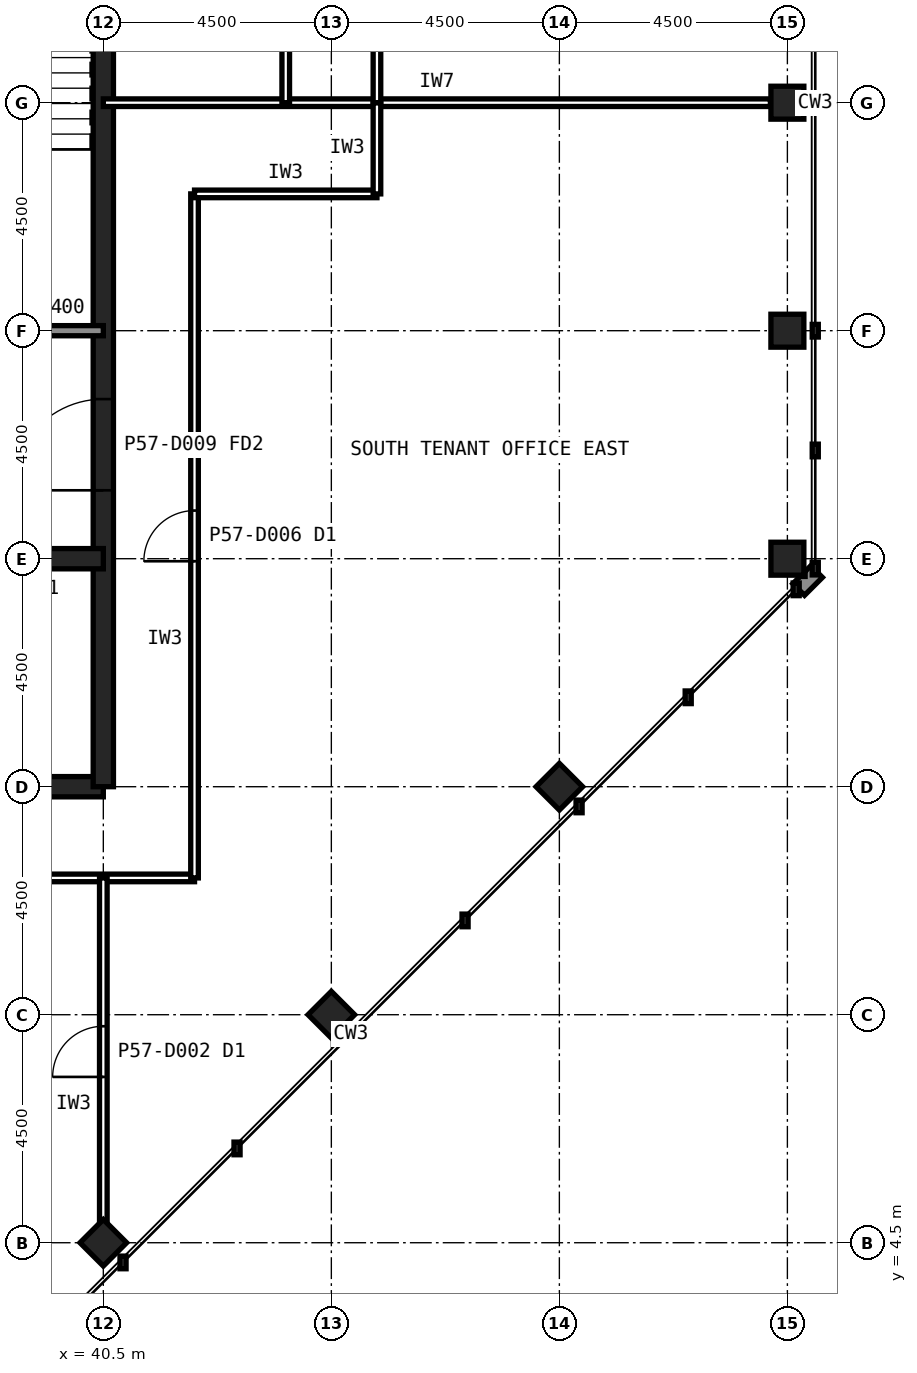
"""IFC4 building model, lengths in metres.
Left out: names, types, materials, properties, quantities, classifications, styles, units other than length and angle.
Written with IfcOpenShell. Run it as: python <this file> out.ifc"""

import sys

from ifc_helpers import new_model, si_unit, direction, frame, frame_2d, origin, origin_2d, place, context, subcontext, project, spatial, rectangle, hollow_rectangle, extrude, element, fill, save


model = new_model("IFC4")
c1 = context("Model", 3, precision=1e-05, world=origin(), true_north=direction((0.0, 1.0)))
c2 = subcontext(c1, "Body", "Model", "MODEL_VIEW")
j1 = project(units=[si_unit("LENGTHUNIT", "METRE"), si_unit("PLANEANGLEUNIT", "RADIAN")], contexts=[c1])
p1 = place(None, origin())
s1 = spatial("IfcSite", under=j1, at=p1, CompositionType="ELEMENT")
p2 = place(p1, origin())
s2 = spatial("IfcBuilding", under=s1, at=p2, CompositionType="ELEMENT")
p3 = place(p2, frame((0.0, 0.0, 238.6)))
s3 = spatial("IfcBuildingStorey", under=s2, at=p3, CompositionType="ELEMENT", Elevation=238.6)
for number, where, z_axis, x_axis in (
    (1, (54.0, 18.0, 0.0), (0.0, 0.0, 1.0), (1.0, 0.0, 0.0)),
    (2, (54.0, 22.5, 0.0), (0.0, 0.0, 1.0), (1.0, 0.0, 0.0)),
    (3, (54.0, 27.0, 0.0), (0.0, 0.0, 1.0), (1.0, 0.0, 0.0)),
    (4, (40.5, 4.5, 0.0), (0.0, 0.0, 1.0), (0.707, 0.707, 0.0)),
    (5, (45.0, 9.0, 0.0), (0.0, 0.0, 1.0), (0.707, 0.707, 0.0)),
    (6, (49.5, 13.5, 0.0), (0.0, 0.0, 1.0), (0.707, 0.707, 0.0)),
):
    element("IfcColumn", number, at=place(p3, frame(where, z_axis=z_axis, x_axis=x_axis)), inside=s3, PredefinedType="COLUMN", context=c2, shape_type="SweptSolid", body=[
        extrude(hollow_rectangle(XDim=0.65, YDim=0.65, WallThickness=0.032, at=origin_2d()), origin(), (0.0, 0.0, 1.0), 4.0),
    ])
p4 = place(p3, frame((13.5, 13.5, 0.0), z_axis=(0.0, 0.0, 1.0), x_axis=(1.0, 0.0, 0.0)))
e7 = element("IfcWall", 7, at=p4, inside=s3, PredefinedType="SHEAR", context=c2, shape_type="SweptSolid", body=[
    extrude(rectangle(XDim=27.0, YDim=0.4, at=frame_2d((13.5, 0.0))), origin(), (0.0, 0.0, 1.0), 4.0),
])
p5 = place(p3, frame((40.5, 13.5, 0.0), z_axis=(0.0, 0.0, 1.0), x_axis=(0.0, 1.0, 0.0)))
e8 = element("IfcWall", 8, at=p5, inside=s3, PredefinedType="SHEAR", context=c2, shape_type="SweptSolid", body=[
    extrude(rectangle(XDim=27.0, YDim=0.4, at=frame_2d((13.5, 0.0))), origin(), (0.0, 0.0, 1.0), 4.0),
])
p6 = place(p5, frame((5.85, 0.0, 0.0)))
e9 = element("IfcOpeningElement", 9, at=p6, cuts=e8, PredefinedType="OPENING", context=c2, shape_type="SweptSolid", body=[
    extrude(rectangle(XDim=1.8, YDim=2.1, at=frame_2d((0.9, 1.05))), frame((0.0, 0.21, 0.0), z_axis=(0.0, -1.0, 0.0), x_axis=(1.0, 0.0, 0.0)), (0.0, 0.0, 1.0), 0.42),
])
p7 = place(p5, frame((19.65, 0.0, 0.0)))
e10 = element("IfcOpeningElement", 10, at=p7, cuts=e8, PredefinedType="OPENING", context=c2, shape_type="SweptSolid", body=[
    extrude(rectangle(XDim=1.2, YDim=2.1, at=frame_2d((0.6, 1.05))), frame((0.0, 0.21, 0.0), z_axis=(0.0, -1.0, 0.0), x_axis=(1.0, 0.0, 0.0)), (0.0, 0.0, 1.0), 0.42),
])
p8 = place(p3, frame((13.5, 18.0, 0.0), z_axis=(0.0, 0.0, 1.0), x_axis=(1.0, 0.0, 0.0)))
e11 = element("IfcWall", 11, at=p8, inside=s3, PredefinedType="SHEAR", context=c2, shape_type="SweptSolid", body=[
    extrude(rectangle(XDim=27.0, YDim=0.4, at=frame_2d((13.5, 0.0))), origin(), (0.0, 0.0, 1.0), 4.0),
])
p9 = place(p8, frame((24.3, 0.0, 0.0)))
e12 = element("IfcOpeningElement", 12, at=p9, cuts=e11, PredefinedType="OPENING", context=c2, shape_type="SweptSolid", body=[
    extrude(rectangle(XDim=0.9, YDim=2.1, at=frame_2d((0.45, 1.05))), frame((0.0, 0.21, 0.0), z_axis=(0.0, -1.0, 0.0), x_axis=(1.0, 0.0, 0.0)), (0.0, 0.0, 1.0), 0.42),
])
p10 = place(p8, frame((5.45, 0.0, 0.0)))
e13 = element("IfcOpeningElement", 13, at=p10, cuts=e11, PredefinedType="OPENING", context=c2, shape_type="SweptSolid", body=[
    extrude(rectangle(XDim=1.1, YDim=2.1, at=frame_2d((0.55, 1.05))), frame((0.0, 0.21, 0.0), z_axis=(0.0, -1.0, 0.0), x_axis=(1.0, 0.0, 0.0)), (0.0, 0.0, 1.0), 0.42),
])
p11 = place(p8, frame((8.45, 0.0, 0.0)))
e14 = element("IfcOpeningElement", 14, at=p11, cuts=e11, PredefinedType="OPENING", context=c2, shape_type="SweptSolid", body=[
    extrude(rectangle(XDim=1.1, YDim=2.1, at=frame_2d((0.55, 1.05))), frame((0.0, 0.21, 0.0), z_axis=(0.0, -1.0, 0.0), x_axis=(1.0, 0.0, 0.0)), (0.0, 0.0, 1.0), 0.42),
])
p12 = place(p8, frame((11.45, 0.0, 0.0)))
e15 = element("IfcOpeningElement", 15, at=p12, cuts=e11, PredefinedType="OPENING", context=c2, shape_type="SweptSolid", body=[
    extrude(rectangle(XDim=1.1, YDim=2.1, at=frame_2d((0.55, 1.05))), frame((0.0, 0.21, 0.0), z_axis=(0.0, -1.0, 0.0), x_axis=(1.0, 0.0, 0.0)), (0.0, 0.0, 1.0), 0.42),
])
p13 = place(p8, frame((14.45, 0.0, 0.0)))
e16 = element("IfcOpeningElement", 16, at=p13, cuts=e11, PredefinedType="OPENING", context=c2, shape_type="SweptSolid", body=[
    extrude(rectangle(XDim=1.1, YDim=2.1, at=frame_2d((0.55, 1.05))), frame((0.0, 0.21, 0.0), z_axis=(0.0, -1.0, 0.0), x_axis=(1.0, 0.0, 0.0)), (0.0, 0.0, 1.0), 0.42),
])
p14 = place(p8, frame((17.45, 0.0, 0.0)))
e17 = element("IfcOpeningElement", 17, at=p14, cuts=e11, PredefinedType="OPENING", context=c2, shape_type="SweptSolid", body=[
    extrude(rectangle(XDim=1.1, YDim=2.1, at=frame_2d((0.55, 1.05))), frame((0.0, 0.21, 0.0), z_axis=(0.0, -1.0, 0.0), x_axis=(1.0, 0.0, 0.0)), (0.0, 0.0, 1.0), 0.42),
])
p15 = place(p8, frame((20.45, 0.0, 0.0)))
e18 = element("IfcOpeningElement", 18, at=p15, cuts=e11, PredefinedType="OPENING", context=c2, shape_type="SweptSolid", body=[
    extrude(rectangle(XDim=1.1, YDim=2.1, at=frame_2d((0.55, 1.05))), frame((0.0, 0.21, 0.0), z_axis=(0.0, -1.0, 0.0), x_axis=(1.0, 0.0, 0.0)), (0.0, 0.0, 1.0), 0.42),
])
p16 = place(p8, frame((1.6, 0.0, 0.0)))
e19 = element("IfcOpeningElement", 19, at=p16, cuts=e11, PredefinedType="OPENING", context=c2, shape_type="SweptSolid", body=[
    extrude(rectangle(XDim=1.3, YDim=2.2, at=frame_2d((0.65, 1.1))), frame((0.0, 0.21, 0.0), z_axis=(0.0, -1.0, 0.0), x_axis=(1.0, 0.0, 0.0)), (0.0, 0.0, 1.0), 0.42),
])
p17 = place(p3, frame((13.5, 22.5, 0.0), z_axis=(0.0, 0.0, 1.0), x_axis=(1.0, 0.0, 0.0)))
e20 = element("IfcWall", 20, at=p17, inside=s3, PredefinedType="SOLIDWALL", context=c2, shape_type="SweptSolid", body=[
    extrude(rectangle(XDim=27.0, YDim=0.2, at=frame_2d((13.5, 0.0))), origin(), (0.0, 0.0, 1.0), 3.84),
])
p18 = place(p17, frame((1.65, 0.0, 0.0)))
e21 = element("IfcOpeningElement", 21, at=p18, cuts=e20, PredefinedType="OPENING", context=c2, shape_type="SweptSolid", body=[
    extrude(rectangle(XDim=1.2, YDim=2.1, at=frame_2d((0.6, 1.05))), frame((0.0, 0.11, 0.0), z_axis=(0.0, -1.0, 0.0), x_axis=(1.0, 0.0, 0.0)), (0.0, 0.0, 1.0), 0.22),
])
p19 = place(p17, frame((6.025, 0.0, 0.0)))
e22 = element("IfcOpeningElement", 22, at=p19, cuts=e20, PredefinedType="OPENING", context=c2, shape_type="SweptSolid", body=[
    extrude(rectangle(XDim=1.0, YDim=2.1, at=frame_2d((0.5, 1.05))), frame((0.0, 0.11, 0.0), z_axis=(0.0, -1.0, 0.0), x_axis=(1.0, 0.0, 0.0)), (0.0, 0.0, 1.0), 0.22),
])
p20 = place(p17, frame((10.525, 0.0, 0.0)))
e23 = element("IfcOpeningElement", 23, at=p20, cuts=e20, PredefinedType="OPENING", context=c2, shape_type="SweptSolid", body=[
    extrude(rectangle(XDim=1.0, YDim=2.1, at=frame_2d((0.5, 1.05))), frame((0.0, 0.11, 0.0), z_axis=(0.0, -1.0, 0.0), x_axis=(1.0, 0.0, 0.0)), (0.0, 0.0, 1.0), 0.22),
])
p21 = place(p17, frame((19.75, 0.0, 0.0)))
e24 = element("IfcOpeningElement", 24, at=p21, cuts=e20, PredefinedType="OPENING", context=c2, shape_type="SweptSolid", body=[
    extrude(rectangle(XDim=1.0, YDim=2.1, at=frame_2d((0.5, 1.05))), frame((0.0, 0.11, 0.0), z_axis=(0.0, -1.0, 0.0), x_axis=(1.0, 0.0, 0.0)), (0.0, 0.0, 1.0), 0.22),
])
p22 = place(p17, frame((15.05, 0.0, 0.0)))
e25 = element("IfcOpeningElement", 25, at=p22, cuts=e20, PredefinedType="OPENING", context=c2, shape_type="SweptSolid", body=[
    extrude(rectangle(XDim=1.4, YDim=2.4, at=frame_2d((0.7, 1.2))), frame((0.0, 0.11, 0.0), z_axis=(0.0, -1.0, 0.0), x_axis=(1.0, 0.0, 0.0)), (0.0, 0.0, 1.0), 0.22),
])
p23 = place(p3, frame((40.5, 27.0, 0.0), z_axis=(0.0, 0.0, 1.0), x_axis=(1.0, 0.0, 0.0)))
e26 = element("IfcWall", 26, at=p23, inside=s3, PredefinedType="PARTITIONING", context=c2, shape_type="SweptSolid", body=[
    extrude(rectangle(XDim=13.165, YDim=0.15, at=frame_2d((6.583, 0.0))), origin(), (0.0, 0.0, 1.0), 2.989),
])
p24 = place(p3, frame((28.8, 11.7, 0.0), z_axis=(0.0, 0.0, 1.0), x_axis=(1.0, 0.0, 0.0)))
e27 = element("IfcWall", 27, at=p24, inside=s3, PredefinedType="PARTITIONING", context=c2, shape_type="SweptSolid", body=[
    extrude(rectangle(XDim=13.5, YDim=0.15, at=frame_2d((6.75, 0.0))), origin(), (0.0, 0.0, 1.0), 3.84),
])
p25 = place(p24, frame((6.25, 0.0, 0.0)))
e28 = element("IfcOpeningElement", 28, at=p25, cuts=e27, PredefinedType="OPENING", context=c2, shape_type="SweptSolid", body=[
    extrude(rectangle(XDim=1.0, YDim=2.1, at=frame_2d((0.5, 1.05))), frame((0.0, 0.085, 0.0), z_axis=(0.0, -1.0, 0.0), x_axis=(1.0, 0.0, 0.0)), (0.0, 0.0, 1.0), 0.17),
])
p26 = place(p3, frame((42.3, 11.7, 0.0), z_axis=(0.0, 0.0, 1.0), x_axis=(0.0, 1.0, 0.0)))
e29 = element("IfcWall", 29, at=p26, inside=s3, PredefinedType="PARTITIONING", context=c2, shape_type="SweptSolid", body=[
    extrude(rectangle(XDim=13.5, YDim=0.15, at=frame_2d((6.75, 0.0))), origin(), (0.0, 0.0, 1.0), 3.84),
])
p27 = place(p26, frame((6.25, 0.0, 0.0)))
e30 = element("IfcOpeningElement", 30, at=p27, cuts=e29, PredefinedType="OPENING", context=c2, shape_type="SweptSolid", body=[
    extrude(rectangle(XDim=1.0, YDim=2.1, at=frame_2d((0.5, 1.05))), frame((0.0, 0.085, 0.0), z_axis=(0.0, -1.0, 0.0), x_axis=(1.0, 0.0, 0.0)), (0.0, 0.0, 1.0), 0.17),
])
p28 = place(p3, frame((42.3, 25.2, 0.0), z_axis=(0.0, 0.0, 1.0), x_axis=(1.0, 0.0, 0.0)))
e31 = element("IfcWall", 31, at=p28, inside=s3, PredefinedType="PARTITIONING", context=c2, shape_type="SweptSolid", body=[
    extrude(rectangle(XDim=3.6, YDim=0.15, at=frame_2d((1.8, 0.0))), origin(), (0.0, 0.0, 1.0), 3.84),
])
p29 = place(p3, frame((45.9, 25.2, 0.0), z_axis=(0.0, 0.0, 1.0), x_axis=(0.0, 1.0, 0.0)))
e32 = element("IfcWall", 32, at=p29, inside=s3, PredefinedType="PARTITIONING", context=c2, shape_type="SweptSolid", body=[
    extrude(rectangle(XDim=1.8, YDim=0.15, at=frame_2d((0.9, 0.0))), origin(), (0.0, 0.0, 1.0), 3.84),
])
p30 = place(p3, frame((45.9, 27.0, 0.0), z_axis=(0.0, 0.0, 1.0), x_axis=(0.0, 1.0, 0.0)))
e33 = element("IfcWall", 33, at=p30, inside=s3, PredefinedType="PARTITIONING", context=c2, shape_type="SweptSolid", body=[
    extrude(rectangle(XDim=6.3, YDim=0.15, at=frame_2d((3.15, 0.0))), origin(), (0.0, 0.0, 1.0), 3.84),
])
p31 = place(p3, frame((44.1, 27.0, 0.0), z_axis=(0.0, 0.0, 1.0), x_axis=(0.0, 1.0, 0.0)))
e34 = element("IfcWall", 34, at=p31, inside=s3, PredefinedType="PARTITIONING", context=c2, shape_type="SweptSolid", body=[
    extrude(rectangle(XDim=4.5, YDim=0.15, at=frame_2d((2.25, 0.0))), origin(), (0.0, 0.0, 1.0), 3.84),
])
p32 = place(p3, frame((40.5, 4.845, 0.0), z_axis=(0.0, 0.0, 1.0), x_axis=(0.0, 1.0, 0.0)))
e35 = element("IfcWall", 35, at=p32, inside=s3, PredefinedType="PARTITIONING", context=c2, shape_type="SweptSolid", body=[
    extrude(rectangle(XDim=6.855, YDim=0.15, at=frame_2d((3.427, 0.0))), origin(), (0.0, 0.0, 1.0), 2.989),
])
p33 = place(p32, frame((2.927, 0.0, 0.0)))
e36 = element("IfcOpeningElement", 36, at=p33, cuts=e35, PredefinedType="OPENING", context=c2, shape_type="SweptSolid", body=[
    extrude(rectangle(XDim=1.0, YDim=2.1, at=frame_2d((0.5, 1.05))), frame((0.0, 0.085, 0.0), z_axis=(0.0, -1.0, 0.0), x_axis=(1.0, 0.0, 0.0)), (0.0, 0.0, 1.0), 0.17),
])
p34 = place(p6, origin())
e37 = element("IfcDoor", 37, at=p34, inside=s3, OperationType="SINGLE_SWING_LEFT", PredefinedType="DOOR", context=c2, shape_type="SweptSolid", body=[
    extrude(rectangle(XDim=1.8, YDim=2.1, at=frame_2d((0.9, 1.05))), frame((0.0, 0.025, 0.0), z_axis=(0.0, -1.0, 0.0), x_axis=(1.0, 0.0, 0.0)), (0.0, 0.0, 1.0), 0.05),
])
fill(e9, e37)
p35 = place(p27, origin())
e38 = element("IfcDoor", 38, at=p35, inside=s3, OperationType="SINGLE_SWING_LEFT", PredefinedType="DOOR", context=c2, shape_type="SweptSolid", body=[
    extrude(rectangle(XDim=1.0, YDim=2.1, at=frame_2d((0.5, 1.05))), frame((0.0, 0.025, 0.0), z_axis=(0.0, -1.0, 0.0), x_axis=(1.0, 0.0, 0.0)), (0.0, 0.0, 1.0), 0.05),
])
fill(e30, e38)
p36 = place(p33, origin())
e39 = element("IfcDoor", 39, at=p36, inside=s3, OperationType="SINGLE_SWING_LEFT", PredefinedType="DOOR", context=c2, shape_type="SweptSolid", body=[
    extrude(rectangle(XDim=1.0, YDim=2.1, at=frame_2d((0.5, 1.05))), frame((0.0, 0.025, 0.0), z_axis=(0.0, -1.0, 0.0), x_axis=(1.0, 0.0, 0.0)), (0.0, 0.0, 1.0), 0.05),
])
fill(e36, e39)
save(model, sys.argv[1])
